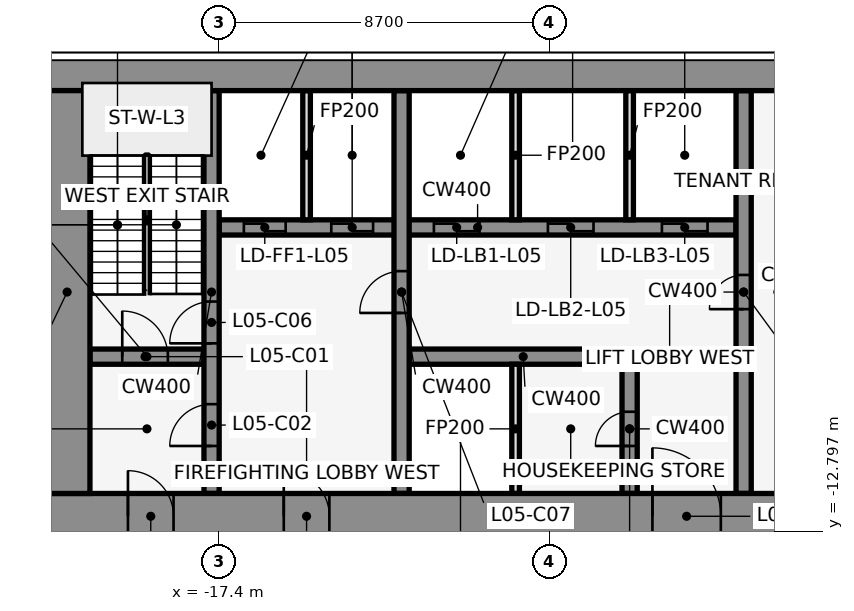
"""IFC4 building model, lengths in metres.
Left out: names, types, materials, properties, quantities, classifications, styles, units other than length and angle.
Written with IfcOpenShell. Run it as: python <this file> out.ifc"""

import sys

from ifc_helpers import new_model, si_unit, direction, frame, frame_2d, origin, place, context, subcontext, project, spatial, rectangle, extrude, element, fill, save


model = new_model("IFC4")
c1 = context("Model", 3, precision=1e-05, world=origin(), true_north=direction((0.0, 1.0)))
c2 = subcontext(c1, "Body", "Model", "MODEL_VIEW")
j1 = project(units=[si_unit("LENGTHUNIT", "METRE"), si_unit("PLANEANGLEUNIT", "RADIAN")], contexts=[c1])
p1 = place(None, origin())
s1 = spatial("IfcSite", under=j1, at=p1, CompositionType="ELEMENT")
p2 = place(p1, origin())
s2 = spatial("IfcBuilding", under=s1, at=p2, CompositionType="ELEMENT")
p3 = place(p2, frame((0.0, 0.0, 30.0)))
s3 = spatial("IfcBuildingStorey", under=s2, at=p3, CompositionType="ELEMENT", Elevation=30.0)
p4 = place(p3, frame((-20.8, -8.2, 0.0), z_axis=(0.0, 0.0, 1.0), x_axis=(1.0, 0.0, 0.0)))
e1 = element("IfcWall", 1, at=p4, inside=s3, PredefinedType="SHEAR", context=c2, shape_type="SweptSolid", body=[
    extrude(rectangle(XDim=3.0, YDim=0.4, at=frame_2d((1.5, 0.0))), origin(), (0.0, 0.0, 1.0), 5.0),
])
p5 = place(p4, frame((0.85, 0.0, 0.0)))
e2 = element("IfcOpeningElement", 2, at=p5, cuts=e1, PredefinedType="OPENING", context=c2, shape_type="SweptSolid", body=[
    extrude(rectangle(XDim=1.2, YDim=2.1, at=frame_2d((0.6, 1.05))), frame((0.0, 0.212, 0.0), z_axis=(0.0, -1.0, 0.0), x_axis=(1.0, 0.0, 0.0)), (0.0, 0.0, 1.0), 0.424),
])
p6 = place(p3, frame((-12.4, -8.2, 0.0), z_axis=(0.0, 0.0, 1.0), x_axis=(1.0, 0.0, 0.0)))
e3 = element("IfcWall", 3, at=p6, inside=s3, PredefinedType="SHEAR", context=c2, shape_type="SweptSolid", body=[
    extrude(rectangle(XDim=6.0, YDim=0.4, at=frame_2d((3.0, 0.0))), origin(), (0.0, 0.0, 1.0), 5.0),
])
p7 = place(p3, frame((-17.4, -4.8, 0.0), z_axis=(0.0, 0.0, 1.0), x_axis=(1.0, 0.0, 0.0)))
e4 = element("IfcWall", 4, at=p7, inside=s3, PredefinedType="SHEAR", context=c2, shape_type="SweptSolid", body=[
    extrude(rectangle(XDim=13.6, YDim=0.4, at=frame_2d((6.8, 0.0))), origin(), (0.0, 0.0, 1.0), 5.0),
])
p8 = place(p7, frame((0.65, 0.0, 0.0)))
e5 = element("IfcOpeningElement", 5, at=p8, cuts=e4, PredefinedType="OPENING", context=c2, shape_type="SweptSolid", body=[
    extrude(rectangle(XDim=1.1, YDim=2.1, at=frame_2d((0.55, 1.05))), frame((0.0, 0.212, 0.0), z_axis=(0.0, -1.0, 0.0), x_axis=(1.0, 0.0, 0.0)), (0.0, 0.0, 1.0), 0.424),
])
p9 = place(p7, frame((2.95, 0.0, 0.0)))
e6 = element("IfcOpeningElement", 6, at=p9, cuts=e4, PredefinedType="OPENING", context=c2, shape_type="SweptSolid", body=[
    extrude(rectangle(XDim=1.1, YDim=2.1, at=frame_2d((0.55, 1.05))), frame((0.0, 0.212, 0.0), z_axis=(0.0, -1.0, 0.0), x_axis=(1.0, 0.0, 0.0)), (0.0, 0.0, 1.0), 0.424),
])
p10 = place(p7, frame((5.65, 0.0, 0.0)))
e7 = element("IfcOpeningElement", 7, at=p10, cuts=e4, PredefinedType="OPENING", context=c2, shape_type="SweptSolid", body=[
    extrude(rectangle(XDim=1.2, YDim=2.1, at=frame_2d((0.6, 1.05))), frame((0.0, 0.212, 0.0), z_axis=(0.0, -1.0, 0.0), x_axis=(1.0, 0.0, 0.0)), (0.0, 0.0, 1.0), 0.424),
])
p11 = place(p7, frame((8.65, 0.0, 0.0)))
e8 = element("IfcOpeningElement", 8, at=p11, cuts=e4, PredefinedType="OPENING", context=c2, shape_type="SweptSolid", body=[
    extrude(rectangle(XDim=1.2, YDim=2.1, at=frame_2d((0.6, 1.05))), frame((0.0, 0.212, 0.0), z_axis=(0.0, -1.0, 0.0), x_axis=(1.0, 0.0, 0.0)), (0.0, 0.0, 1.0), 0.424),
])
p12 = place(p7, frame((11.65, 0.0, 0.0)))
e9 = element("IfcOpeningElement", 9, at=p12, cuts=e4, PredefinedType="OPENING", context=c2, shape_type="SweptSolid", body=[
    extrude(rectangle(XDim=1.2, YDim=2.1, at=frame_2d((0.6, 1.05))), frame((0.0, 0.212, 0.0), z_axis=(0.0, -1.0, 0.0), x_axis=(1.0, 0.0, 0.0)), (0.0, 0.0, 1.0), 0.424),
])
p13 = place(p3, frame((-17.6, -11.8, 0.0), z_axis=(0.0, 0.0, 1.0), x_axis=(0.0, 1.0, 0.0)))
e10 = element("IfcWall", 10, at=p13, inside=s3, PredefinedType="SHEAR", context=c2, shape_type="SweptSolid", body=[
    extrude(rectangle(XDim=10.6, YDim=0.4, at=frame_2d((5.3, 0.0))), origin(), (0.0, 0.0, 1.0), 5.0),
])
p14 = place(p13, frame((1.25, 0.0, 0.0)))
e11 = element("IfcOpeningElement", 11, at=p14, cuts=e10, PredefinedType="OPENING", context=c2, shape_type="SweptSolid", body=[
    extrude(rectangle(XDim=1.1, YDim=2.1, at=frame_2d((0.55, 1.05))), frame((0.0, 0.212, 0.0), z_axis=(0.0, -1.0, 0.0), x_axis=(1.0, 0.0, 0.0)), (0.0, 0.0, 1.0), 0.424),
])
p15 = place(p13, frame((3.95, 0.0, 0.0)))
e12 = element("IfcOpeningElement", 12, at=p15, cuts=e10, PredefinedType="OPENING", context=c2, shape_type="SweptSolid", body=[
    extrude(rectangle(XDim=1.1, YDim=2.1, at=frame_2d((0.55, 1.05))), frame((0.0, 0.212, 0.0), z_axis=(0.0, -1.0, 0.0), x_axis=(1.0, 0.0, 0.0)), (0.0, 0.0, 1.0), 0.424),
])
p16 = place(p3, frame((-15.1, -4.6, 0.0), z_axis=(0.0, 0.0, 1.0), x_axis=(0.0, 1.0, 0.0)))
e13 = element("IfcWall", 13, at=p16, inside=s3, PredefinedType="PARTITIONING", context=c2, shape_type="SweptSolid", body=[
    extrude(rectangle(XDim=3.4, YDim=0.2, at=frame_2d((1.7, 0.0))), origin(), (0.0, 0.0, 1.0), 3.74),
])
p17 = place(p3, frame((-12.6, -11.8, 0.0), z_axis=(0.0, 0.0, 1.0), x_axis=(0.0, 1.0, 0.0)))
e14 = element("IfcWall", 14, at=p17, inside=s3, PredefinedType="SHEAR", context=c2, shape_type="SweptSolid", body=[
    extrude(rectangle(XDim=10.6, YDim=0.4, at=frame_2d((5.3, 0.0))), origin(), (0.0, 0.0, 1.0), 5.0),
])
p18 = place(p17, frame((4.75, 0.0, 0.0)))
e15 = element("IfcOpeningElement", 15, at=p18, cuts=e14, PredefinedType="OPENING", context=c2, shape_type="SweptSolid", body=[
    extrude(rectangle(XDim=1.1, YDim=2.1, at=frame_2d((0.55, 1.05))), frame((0.0, 0.212, 0.0), z_axis=(0.0, -1.0, 0.0), x_axis=(1.0, 0.0, 0.0)), (0.0, 0.0, 1.0), 0.424),
])
for number, where, z_axis, x_axis in (
    (16, (-9.6, -11.8, 0.0), (0.0, 0.0, 1.0), (0.0, 1.0, 0.0)),
    (17, (-9.6, -4.6, 0.0), (0.0, 0.0, 1.0), (0.0, 1.0, 0.0)),
):
    element("IfcWall", number, at=place(p3, frame(where, z_axis=z_axis, x_axis=x_axis)), inside=s3, PredefinedType="PARTITIONING", context=c2, shape_type="SweptSolid", body=[
        extrude(rectangle(XDim=3.4, YDim=0.2, at=frame_2d((1.7, 0.0))), origin(), (0.0, 0.0, 1.0), 3.74),
    ])
p19 = place(p3, frame((-6.6, -11.8, 0.0), z_axis=(0.0, 0.0, 1.0), x_axis=(0.0, 1.0, 0.0)))
e18 = element("IfcWall", 18, at=p19, inside=s3, PredefinedType="SHEAR", context=c2, shape_type="SweptSolid", body=[
    extrude(rectangle(XDim=3.4, YDim=0.4, at=frame_2d((1.7, 0.0))), origin(), (0.0, 0.0, 1.0), 5.0),
])
p20 = place(p19, frame((1.25, 0.0, 0.0)))
e19 = element("IfcOpeningElement", 19, at=p20, cuts=e18, PredefinedType="OPENING", context=c2, shape_type="SweptSolid", body=[
    extrude(rectangle(XDim=0.9, YDim=2.1, at=frame_2d((0.45, 1.05))), frame((0.0, 0.212, 0.0), z_axis=(0.0, -1.0, 0.0), x_axis=(1.0, 0.0, 0.0)), (0.0, 0.0, 1.0), 0.424),
])
p21 = place(p3, frame((-6.6, -4.6, 0.0), z_axis=(0.0, 0.0, 1.0), x_axis=(0.0, 1.0, 0.0)))
e20 = element("IfcWall", 20, at=p21, inside=s3, PredefinedType="PARTITIONING", context=c2, shape_type="SweptSolid", body=[
    extrude(rectangle(XDim=3.4, YDim=0.2, at=frame_2d((1.7, 0.0))), origin(), (0.0, 0.0, 1.0), 3.74),
])
p22 = place(p3, frame((-3.6, -11.8, 0.0), z_axis=(0.0, 0.0, 1.0), x_axis=(0.0, 1.0, 0.0)))
e21 = element("IfcWall", 21, at=p22, inside=s3, PredefinedType="SHEAR", context=c2, shape_type="SweptSolid", body=[
    extrude(rectangle(XDim=10.6, YDim=0.4, at=frame_2d((5.3, 0.0))), origin(), (0.0, 0.0, 1.0), 5.0),
])
p23 = place(p22, frame((4.85, 0.0, 0.0)))
e22 = element("IfcOpeningElement", 22, at=p23, cuts=e21, PredefinedType="OPENING", context=c2, shape_type="SweptSolid", body=[
    extrude(rectangle(XDim=0.9, YDim=2.1, at=frame_2d((0.45, 1.05))), frame((0.0, 0.212, 0.0), z_axis=(0.0, -1.0, 0.0), x_axis=(1.0, 0.0, 0.0)), (0.0, 0.0, 1.0), 0.424),
])
p24 = place(p3, frame((-22.0, -0.6, 0.0), z_axis=(0.0, 0.0, 1.0), x_axis=(1.0, 0.0, 0.0)))
e23 = element("IfcWall", 23, at=p24, inside=s3, PredefinedType="SHEAR", context=c2, shape_type="SweptSolid", body=[
    extrude(rectangle(XDim=44.0, YDim=1.2, at=frame_2d((22.0, 0.0))), origin(), (0.0, 0.0, 1.0), 5.0),
])
p25 = place(p3, frame((-22.0, -12.4, 0.0), z_axis=(0.0, 0.0, 1.0), x_axis=(1.0, 0.0, 0.0)))
e24 = element("IfcWall", 24, at=p25, inside=s3, PredefinedType="SHEAR", context=c2, shape_type="SweptSolid", body=[
    extrude(rectangle(XDim=44.0, YDim=1.2, at=frame_2d((22.0, 0.0))), origin(), (0.0, 0.0, 1.0), 5.0),
])
p26 = place(p25, frame((2.2, 0.0, 0.0)))
e25 = element("IfcOpeningElement", 25, at=p26, cuts=e24, PredefinedType="OPENING", context=c2, shape_type="SweptSolid", body=[
    extrude(rectangle(XDim=1.2, YDim=2.1, at=frame_2d((0.6, 1.05))), frame((0.0, 0.612, 0.0), z_axis=(0.0, -1.0, 0.0), x_axis=(1.0, 0.0, 0.0)), (0.0, 0.0, 1.0), 1.224),
])
p27 = place(p25, frame((21.4, 0.0, 0.0)))
e26 = element("IfcOpeningElement", 26, at=p27, cuts=e24, PredefinedType="OPENING", context=c2, shape_type="SweptSolid", body=[
    extrude(rectangle(XDim=1.2, YDim=2.1, at=frame_2d((0.6, 1.05))), frame((0.0, 0.612, 0.0), z_axis=(0.0, -1.0, 0.0), x_axis=(1.0, 0.0, 0.0)), (0.0, 0.0, 1.0), 1.224),
])
p28 = place(p25, frame((40.6, 0.0, 0.0)))
e27 = element("IfcOpeningElement", 27, at=p28, cuts=e24, PredefinedType="OPENING", context=c2, shape_type="SweptSolid", body=[
    extrude(rectangle(XDim=1.2, YDim=2.1, at=frame_2d((0.6, 1.05))), frame((0.0, 0.612, 0.0), z_axis=(0.0, -1.0, 0.0), x_axis=(1.0, 0.0, 0.0)), (0.0, 0.0, 1.0), 1.224),
])
p29 = place(p25, frame((16.0, 0.0, 0.0)))
e28 = element("IfcOpeningElement", 28, at=p29, cuts=e24, PredefinedType="OPENING", context=c2, shape_type="SweptSolid", body=[
    extrude(rectangle(XDim=1.8, YDim=2.1, at=frame_2d((0.9, 1.05))), frame((0.0, 0.612, 0.0), z_axis=(0.0, -1.0, 0.0), x_axis=(1.0, 0.0, 0.0)), (0.0, 0.0, 1.0), 1.224),
])
p30 = place(p25, frame((6.3, 0.0, 0.0)))
e29 = element("IfcOpeningElement", 29, at=p30, cuts=e24, PredefinedType="OPENING", context=c2, shape_type="SweptSolid", body=[
    extrude(rectangle(XDim=1.2, YDim=2.1, at=frame_2d((0.6, 1.05))), frame((0.0, 0.612, 0.0), z_axis=(0.0, -1.0, 0.0), x_axis=(1.0, 0.0, 0.0)), (0.0, 0.0, 1.0), 1.224),
])
p31 = place(p25, frame((26.2, 0.0, 0.0)))
e30 = element("IfcOpeningElement", 30, at=p31, cuts=e24, PredefinedType="OPENING", context=c2, shape_type="SweptSolid", body=[
    extrude(rectangle(XDim=1.8, YDim=2.1, at=frame_2d((0.9, 1.05))), frame((0.0, 0.612, 0.0), z_axis=(0.0, -1.0, 0.0), x_axis=(1.0, 0.0, 0.0)), (0.0, 0.0, 1.0), 1.224),
])
p32 = place(p25, frame((36.5, 0.0, 0.0)))
e31 = element("IfcOpeningElement", 31, at=p32, cuts=e24, PredefinedType="OPENING", context=c2, shape_type="SweptSolid", body=[
    extrude(rectangle(XDim=1.2, YDim=2.1, at=frame_2d((0.6, 1.05))), frame((0.0, 0.612, 0.0), z_axis=(0.0, -1.0, 0.0), x_axis=(1.0, 0.0, 0.0)), (0.0, 0.0, 1.0), 1.224),
])
p33 = place(p3, frame((-21.4, -11.8, 0.0), z_axis=(0.0, 0.0, 1.0), x_axis=(0.0, 1.0, 0.0)))
e32 = element("IfcWall", 32, at=p33, inside=s3, PredefinedType="SHEAR", context=c2, shape_type="SweptSolid", body=[
    extrude(rectangle(XDim=10.6, YDim=1.2, at=frame_2d((5.3, 0.0))), origin(), (0.0, 0.0, 1.0), 5.0),
])
p34 = place(p5, origin())
e33 = element("IfcDoor", 33, at=p34, inside=s3, OperationType="SINGLE_SWING_LEFT", PredefinedType="DOOR", context=c2, shape_type="SweptSolid", body=[
    extrude(rectangle(XDim=1.2, YDim=2.1, at=frame_2d((0.6, 1.05))), frame((0.0, 0.025, 0.0), z_axis=(0.0, -1.0, 0.0), x_axis=(1.0, 0.0, 0.0)), (0.0, 0.0, 1.0), 0.05),
])
fill(e2, e33)
p35 = place(p14, frame((1.1, 0.0, 0.0), z_axis=(0.0, 0.0, 1.0), x_axis=(-1.0, 0.0, 0.0)))
e34 = element("IfcDoor", 34, at=p35, inside=s3, OperationType="SINGLE_SWING_LEFT", PredefinedType="DOOR", context=c2, shape_type="SweptSolid", body=[
    extrude(rectangle(XDim=1.1, YDim=2.1, at=frame_2d((0.55, 1.05))), frame((0.0, 0.025, 0.0), z_axis=(0.0, -1.0, 0.0), x_axis=(1.0, 0.0, 0.0)), (0.0, 0.0, 1.0), 0.05),
])
fill(e11, e34)
p36 = place(p8, origin())
e35 = element("IfcDoor", 35, at=p36, inside=s3, OperationType="DOUBLE_DOOR_SLIDING", PredefinedType="DOOR", context=c2, shape_type="SweptSolid", body=[
    extrude(rectangle(XDim=1.1, YDim=2.1, at=frame_2d((0.55, 1.05))), frame((0.0, 0.025, 0.0), z_axis=(0.0, -1.0, 0.0), x_axis=(1.0, 0.0, 0.0)), (0.0, 0.0, 1.0), 0.05),
])
fill(e5, e35)
p37 = place(p9, origin())
e36 = element("IfcDoor", 36, at=p37, inside=s3, OperationType="DOUBLE_DOOR_SLIDING", PredefinedType="DOOR", context=c2, shape_type="SweptSolid", body=[
    extrude(rectangle(XDim=1.1, YDim=2.1, at=frame_2d((0.55, 1.05))), frame((0.0, 0.025, 0.0), z_axis=(0.0, -1.0, 0.0), x_axis=(1.0, 0.0, 0.0)), (0.0, 0.0, 1.0), 0.05),
])
fill(e6, e36)
p38 = place(p10, origin())
e37 = element("IfcDoor", 37, at=p38, inside=s3, OperationType="DOUBLE_DOOR_SLIDING", PredefinedType="DOOR", context=c2, shape_type="SweptSolid", body=[
    extrude(rectangle(XDim=1.2, YDim=2.1, at=frame_2d((0.6, 1.05))), frame((0.0, 0.025, 0.0), z_axis=(0.0, -1.0, 0.0), x_axis=(1.0, 0.0, 0.0)), (0.0, 0.0, 1.0), 0.05),
])
fill(e7, e37)
p39 = place(p11, origin())
e38 = element("IfcDoor", 38, at=p39, inside=s3, OperationType="DOUBLE_DOOR_SLIDING", PredefinedType="DOOR", context=c2, shape_type="SweptSolid", body=[
    extrude(rectangle(XDim=1.2, YDim=2.1, at=frame_2d((0.6, 1.05))), frame((0.0, 0.025, 0.0), z_axis=(0.0, -1.0, 0.0), x_axis=(1.0, 0.0, 0.0)), (0.0, 0.0, 1.0), 0.05),
])
fill(e8, e38)
p40 = place(p12, origin())
e39 = element("IfcDoor", 39, at=p40, inside=s3, OperationType="DOUBLE_DOOR_SLIDING", PredefinedType="DOOR", context=c2, shape_type="SweptSolid", body=[
    extrude(rectangle(XDim=1.2, YDim=2.1, at=frame_2d((0.6, 1.05))), frame((0.0, 0.025, 0.0), z_axis=(0.0, -1.0, 0.0), x_axis=(1.0, 0.0, 0.0)), (0.0, 0.0, 1.0), 0.05),
])
fill(e9, e39)
p41 = place(p15, frame((1.1, 0.0, 0.0), z_axis=(0.0, 0.0, 1.0), x_axis=(-1.0, 0.0, 0.0)))
e40 = element("IfcDoor", 40, at=p41, inside=s3, OperationType="SINGLE_SWING_LEFT", PredefinedType="DOOR", context=c2, shape_type="SweptSolid", body=[
    extrude(rectangle(XDim=1.1, YDim=2.1, at=frame_2d((0.55, 1.05))), frame((0.0, 0.025, 0.0), z_axis=(0.0, -1.0, 0.0), x_axis=(1.0, 0.0, 0.0)), (0.0, 0.0, 1.0), 0.05),
])
fill(e12, e40)
p42 = place(p18, origin())
e41 = element("IfcDoor", 41, at=p42, inside=s3, OperationType="SINGLE_SWING_LEFT", PredefinedType="DOOR", context=c2, shape_type="SweptSolid", body=[
    extrude(rectangle(XDim=1.1, YDim=2.1, at=frame_2d((0.55, 1.05))), frame((0.0, 0.025, 0.0), z_axis=(0.0, -1.0, 0.0), x_axis=(1.0, 0.0, 0.0)), (0.0, 0.0, 1.0), 0.05),
])
fill(e15, e41)
p43 = place(p23, frame((0.9, 0.0, 0.0), z_axis=(0.0, 0.0, 1.0), x_axis=(-1.0, 0.0, 0.0)))
e42 = element("IfcDoor", 42, at=p43, inside=s3, OperationType="SINGLE_SWING_LEFT", PredefinedType="DOOR", context=c2, shape_type="SweptSolid", body=[
    extrude(rectangle(XDim=0.9, YDim=2.1, at=frame_2d((0.45, 1.05))), frame((0.0, 0.025, 0.0), z_axis=(0.0, -1.0, 0.0), x_axis=(1.0, 0.0, 0.0)), (0.0, 0.0, 1.0), 0.05),
])
fill(e22, e42)
p44 = place(p20, origin())
e43 = element("IfcDoor", 43, at=p44, inside=s3, OperationType="SINGLE_SWING_LEFT", PredefinedType="DOOR", context=c2, shape_type="SweptSolid", body=[
    extrude(rectangle(XDim=0.9, YDim=2.1, at=frame_2d((0.45, 1.05))), frame((0.0, 0.025, 0.0), z_axis=(0.0, -1.0, 0.0), x_axis=(1.0, 0.0, 0.0)), (0.0, 0.0, 1.0), 0.05),
])
fill(e19, e43)
p45 = place(p26, frame((1.2, 0.0, 0.0), z_axis=(0.0, 0.0, 1.0), x_axis=(-1.0, 0.0, 0.0)))
e44 = element("IfcDoor", 44, at=p45, inside=s3, OperationType="SINGLE_SWING_RIGHT", PredefinedType="DOOR", context=c2, shape_type="SweptSolid", body=[
    extrude(rectangle(XDim=1.2, YDim=2.1, at=frame_2d((0.6, 1.05))), frame((0.0, 0.025, 0.0), z_axis=(0.0, -1.0, 0.0), x_axis=(1.0, 0.0, 0.0)), (0.0, 0.0, 1.0), 0.05),
])
fill(e25, e44)
p46 = place(p29, origin())
e45 = element("IfcDoor", 45, at=p46, inside=s3, OperationType="SINGLE_SWING_LEFT", PredefinedType="DOOR", context=c2, shape_type="SweptSolid", body=[
    extrude(rectangle(XDim=1.8, YDim=2.1, at=frame_2d((0.9, 1.05))), frame((0.0, 0.025, 0.0), z_axis=(0.0, -1.0, 0.0), x_axis=(1.0, 0.0, 0.0)), (0.0, 0.0, 1.0), 0.05),
])
fill(e28, e45)
p47 = place(p30, frame((1.2, 0.0, 0.0), z_axis=(0.0, 0.0, 1.0), x_axis=(-1.0, 0.0, 0.0)))
e46 = element("IfcDoor", 46, at=p47, inside=s3, OperationType="SINGLE_SWING_RIGHT", PredefinedType="DOOR", context=c2, shape_type="SweptSolid", body=[
    extrude(rectangle(XDim=1.2, YDim=2.1, at=frame_2d((0.6, 1.05))), frame((0.0, 0.025, 0.0), z_axis=(0.0, -1.0, 0.0), x_axis=(1.0, 0.0, 0.0)), (0.0, 0.0, 1.0), 0.05),
])
fill(e29, e46)
save(model, sys.argv[1])
